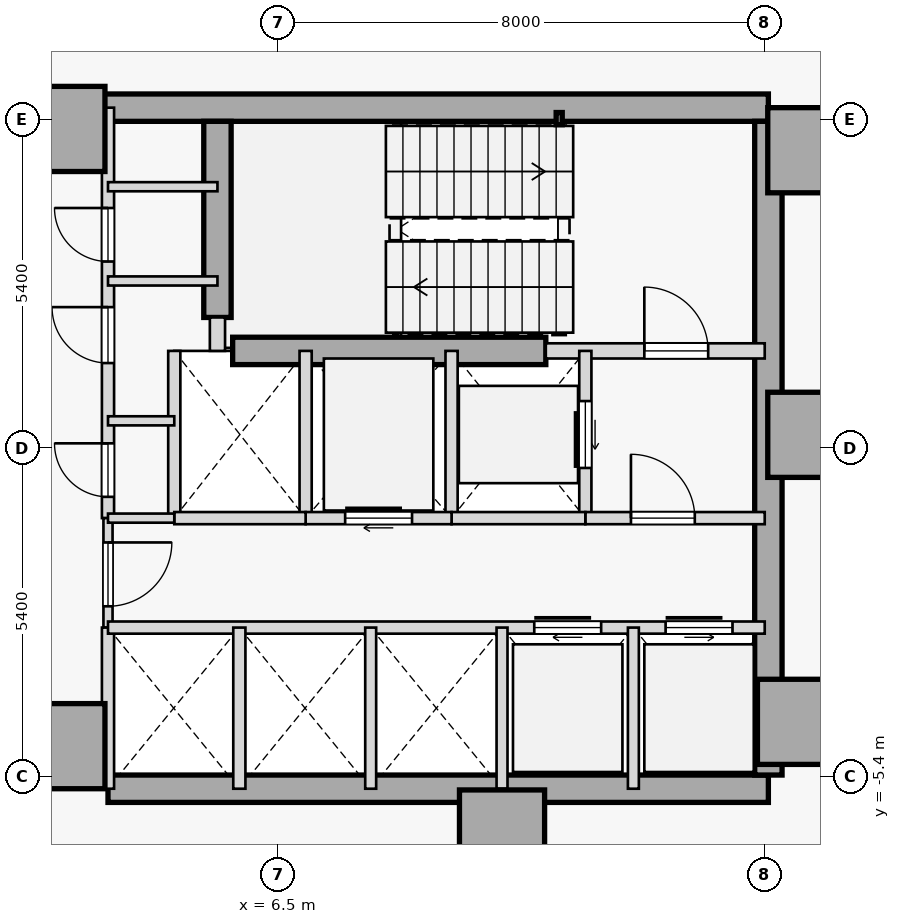
"""IFC4 building model, lengths in metres.
Left out: names, types, materials, properties, quantities, classifications, styles, units other than length and angle.
Written with IfcOpenShell. Run it as: python <this file> out.ifc"""

import sys

from ifc_helpers import new_model, si_unit, direction, frame, frame_2d, origin, origin_2d, place, context, subcontext, project, spatial, rectangle, hollow_rectangle, extrude, element, fill, save


model = new_model("IFC4")
c1 = context("Model", 3, precision=1e-05, world=origin(), true_north=direction((0.0, 1.0)))
c2 = subcontext(c1, "Body", "Model", "MODEL_VIEW")
j1 = project(units=[si_unit("LENGTHUNIT", "METRE"), si_unit("PLANEANGLEUNIT", "RADIAN")], contexts=[c1])
p1 = place(None, origin())
s1 = spatial("IfcSite", under=j1, at=p1, CompositionType="ELEMENT")
p2 = place(p1, origin())
s2 = spatial("IfcBuilding", under=s1, at=p2, CompositionType="ELEMENT")
p3 = place(p2, frame((0.0, 0.0, 63.6)))
s3 = spatial("IfcBuildingStorey", under=s2, at=p3, CompositionType="ELEMENT", Elevation=63.6)
for number, where, z_axis, x_axis in (
    (1, (15.25, 4.9, 0.0), (0.0, 0.0, 1.0), (1.0, 0.0, 0.0)),
    (2, (15.25, 0.22, 0.0), (0.0, 0.0, 1.0), (1.0, 0.0, 0.0)),
    (3, (15.08, -4.5, 0.0), (0.0, 0.0, 1.0), (1.0, 0.0, 0.0)),
    (4, (10.18, -6.32, 0.0), (0.0, 0.0, 1.0), (1.0, 0.0, 0.0)),
    (5, (2.95, -4.9, 0.0), (0.0, 0.0, 1.0), (1.0, 0.0, 0.0)),
    (6, (2.95, 5.25, 0.0), (0.0, 0.0, 1.0), (1.0, 0.0, 0.0)),
):
    element("IfcColumn", number, at=place(p3, frame(where, z_axis=z_axis, x_axis=x_axis)), inside=s3, PredefinedType="COLUMN", context=c2, shape_type="SweptSolid", body=[
        extrude(rectangle(XDim=1.4, YDim=1.4, at=origin_2d()), origin(), (0.0, 0.0, 1.0), 3.8),
    ])
p4 = place(p3, frame((3.15, 5.6, 0.0), z_axis=(0.0, 0.0, 1.0), x_axis=(1.0, 0.0, 0.0)))
e7 = element("IfcWall", 7, at=p4, inside=s3, PredefinedType="SHEAR", context=c2, shape_type="SweptSolid", body=[
    extrude(rectangle(XDim=11.41, YDim=0.45, at=frame_2d((5.705, 0.0))), origin(), (0.0, 0.0, 1.0), 3.575),
])
p5 = place(p3, frame((3.7, -5.6, 0.0), z_axis=(0.0, 0.0, 1.0), x_axis=(1.0, 0.0, 0.0)))
e8 = element("IfcWall", 8, at=p5, inside=s3, PredefinedType="SHEAR", context=c2, shape_type="SweptSolid", body=[
    extrude(rectangle(XDim=10.86, YDim=0.45, at=frame_2d((5.43, 0.0))), origin(), (0.0, 0.0, 1.0), 3.575),
])
p6 = place(p3, frame((14.56, -5.375, 0.0), z_axis=(0.0, 0.0, 1.0), x_axis=(0.0, 1.0, 0.0)))
e9 = element("IfcWall", 9, at=p6, inside=s3, PredefinedType="SHEAR", context=c2, shape_type="SweptSolid", body=[
    extrude(rectangle(XDim=10.75, YDim=0.45, at=frame_2d((5.375, 0.0))), origin(), (0.0, 0.0, 1.0), 3.575),
])
p7 = place(p3, frame((5.5, 2.15, 0.0), z_axis=(0.0, 0.0, 1.0), x_axis=(0.0, 1.0, 0.0)))
e10 = element("IfcWall", 10, at=p7, inside=s3, PredefinedType="SHEAR", context=c2, shape_type="SweptSolid", body=[
    extrude(rectangle(XDim=3.225, YDim=0.45, at=frame_2d((1.613, 0.0))), origin(), (0.0, 0.0, 1.0), 3.575),
])
p8 = place(p3, frame((5.75, 1.6, 0.0), z_axis=(0.0, 0.0, 1.0), x_axis=(1.0, 0.0, 0.0)))
e11 = element("IfcWall", 11, at=p8, inside=s3, PredefinedType="SHEAR", context=c2, shape_type="SweptSolid", body=[
    extrude(rectangle(XDim=5.15, YDim=0.45, at=frame_2d((2.575, 0.0))), origin(), (0.0, 0.0, 1.0), 3.575),
])
p9 = place(p3, frame((11.12, 5.42, 0.0), z_axis=(0.0, 0.0, 1.0), x_axis=(1.0, 0.0, 0.0)))
e12 = element("IfcColumn", 12, at=p9, inside=s3, PredefinedType="COLUMN", context=c2, shape_type="SweptSolid", body=[
    extrude(hollow_rectangle(XDim=0.1, YDim=0.2, WallThickness=0.008, at=origin_2d()), origin(), (0.0, 0.0, 1.0), 3.8),
])
p10 = place(p3, frame((10.9, 1.6, 0.0), z_axis=(0.0, 0.0, 1.0), x_axis=(1.0, 0.0, 0.0)))
e13 = element("IfcWall", 13, at=p10, inside=s3, PredefinedType="STANDARD", context=c2, shape_type="SweptSolid", body=[
    extrude(rectangle(XDim=3.6, YDim=0.25, at=frame_2d((1.8, 0.0))), origin(), (0.0, 0.0, 1.0), 3.575),
])
p11 = place(p10, frame((1.62, 0.0, 0.0)))
e14 = element("IfcOpeningElement", 14, at=p11, cuts=e13, PredefinedType="OPENING", context=c2, shape_type="SweptSolid", body=[
    extrude(rectangle(XDim=1.05, YDim=2.15, at=frame_2d((0.525, 1.075))), frame((0.0, 0.135, 0.0), z_axis=(0.0, -1.0, 0.0), x_axis=(1.0, 0.0, 0.0)), (0.0, 0.0, 1.0), 0.27),
])
p12 = place(p3, frame((5.5, 1.6, 0.0), z_axis=(0.0, 0.0, 1.0), x_axis=(0.0, 1.0, 0.0)))
e15 = element("IfcWall", 15, at=p12, inside=s3, PredefinedType="STANDARD", context=c2, shape_type="SweptSolid", body=[
    extrude(rectangle(XDim=0.55, YDim=0.25, at=frame_2d((0.275, 0.0))), origin(), (0.0, 0.0, 1.0), 3.575),
])
p13 = place(p3, frame((3.7, -1.15, 0.0), z_axis=(0.0, 0.0, 1.0), x_axis=(0.0, 1.0, 0.0)))
e16 = element("IfcWall", 16, at=p13, inside=s3, PredefinedType="STANDARD", context=c2, shape_type="SweptSolid", body=[
    extrude(rectangle(XDim=6.75, YDim=0.2, at=frame_2d((3.375, 0.0))), origin(), (0.0, 0.0, 1.0), 3.575),
])
p14 = place(p13, frame((0.35, 0.0, 0.0)))
e17 = element("IfcOpeningElement", 17, at=p14, cuts=e16, PredefinedType="OPENING", context=c2, shape_type="SweptSolid", body=[
    extrude(rectangle(XDim=0.88, YDim=2.15, at=frame_2d((0.44, 1.075))), frame((0.0, 0.11, 0.0), z_axis=(0.0, -1.0, 0.0), x_axis=(1.0, 0.0, 0.0)), (0.0, 0.0, 1.0), 0.22),
])
p15 = place(p13, frame((2.55, 0.0, 0.0)))
e18 = element("IfcOpeningElement", 18, at=p15, cuts=e16, PredefinedType="OPENING", context=c2, shape_type="SweptSolid", body=[
    extrude(rectangle(XDim=0.92, YDim=2.15, at=frame_2d((0.46, 1.075))), frame((0.0, 0.11, 0.0), z_axis=(0.0, -1.0, 0.0), x_axis=(1.0, 0.0, 0.0)), (0.0, 0.0, 1.0), 0.22),
])
p16 = place(p13, frame((4.22, 0.0, 0.0)))
e19 = element("IfcOpeningElement", 19, at=p16, cuts=e16, PredefinedType="OPENING", context=c2, shape_type="SweptSolid", body=[
    extrude(rectangle(XDim=0.88, YDim=2.15, at=frame_2d((0.44, 1.075))), frame((0.0, 0.11, 0.0), z_axis=(0.0, -1.0, 0.0), x_axis=(1.0, 0.0, 0.0)), (0.0, 0.0, 1.0), 0.22),
])
p17 = place(p3, frame((3.7, -2.95, 0.0), z_axis=(0.0, 0.0, 1.0), x_axis=(0.0, 1.0, 0.0)))
e20 = element("IfcWall", 20, at=p17, inside=s3, PredefinedType="PARTITIONING", context=c2, shape_type="SweptSolid", body=[
    extrude(rectangle(XDim=1.8, YDim=0.15, at=frame_2d((0.9, 0.0))), origin(), (0.0, 0.0, 1.0), 3.575),
])
p18 = place(p17, frame((0.35, 0.0, 0.0)))
e21 = element("IfcOpeningElement", 21, at=p18, cuts=e20, PredefinedType="OPENING", context=c2, shape_type="SweptSolid", body=[
    extrude(rectangle(XDim=1.05, YDim=2.18, at=frame_2d((0.525, 1.09))), frame((0.0, 0.085, 0.0), z_axis=(0.0, -1.0, 0.0), x_axis=(1.0, 0.0, 0.0)), (0.0, 0.0, 1.0), 0.17),
])
p19 = place(p3, frame((3.7, -5.6, 0.0), z_axis=(0.0, 0.0, 1.0), x_axis=(0.0, 1.0, 0.0)))
e22 = element("IfcWall", 22, at=p19, inside=s3, PredefinedType="STANDARD", context=c2, shape_type="SweptSolid", body=[
    extrude(rectangle(XDim=2.65, YDim=0.2, at=frame_2d((1.325, 0.0))), origin(), (0.0, 0.0, 1.0), 3.575),
])
p20 = place(p3, frame((11.55, -1.15, 0.0), z_axis=(0.0, 0.0, 1.0), x_axis=(0.0, 1.0, 0.0)))
e23 = element("IfcWall", 23, at=p20, inside=s3, PredefinedType="STANDARD", context=c2, shape_type="SweptSolid", body=[
    extrude(rectangle(XDim=2.75, YDim=0.2, at=frame_2d((1.375, 0.0))), origin(), (0.0, 0.0, 1.0), 3.575),
])
p21 = place(p20, frame((0.825, 0.0, 0.0)))
e24 = element("IfcOpeningElement", 24, at=p21, cuts=e23, PredefinedType="OPENING", context=c2, shape_type="SweptSolid", body=[
    extrude(rectangle(XDim=1.1, YDim=2.15, at=frame_2d((0.55, 1.075))), frame((0.0, 0.11, 0.0), z_axis=(0.0, -1.0, 0.0), x_axis=(1.0, 0.0, 0.0)), (0.0, 0.0, 1.0), 0.22),
])
p22 = place(p3, frame((9.35, -1.15, 0.0), z_axis=(0.0, 0.0, 1.0), x_axis=(0.0, 1.0, 0.0)))
e25 = element("IfcWall", 25, at=p22, inside=s3, PredefinedType="STANDARD", context=c2, shape_type="SweptSolid", body=[
    extrude(rectangle(XDim=2.75, YDim=0.2, at=frame_2d((1.375, 0.0))), origin(), (0.0, 0.0, 1.0), 3.575),
])
p23 = place(p3, frame((11.55, -1.15, 0.0), z_axis=(0.0, 0.0, 1.0), x_axis=(1.0, 0.0, 0.0)))
e26 = element("IfcWall", 26, at=p23, inside=s3, PredefinedType="STANDARD", context=c2, shape_type="SweptSolid", body=[
    extrude(rectangle(XDim=2.95, YDim=0.2, at=frame_2d((1.475, 0.0))), origin(), (0.0, 0.0, 1.0), 3.575),
])
p24 = place(p23, frame((0.75, 0.0, 0.0)))
e27 = element("IfcOpeningElement", 27, at=p24, cuts=e26, PredefinedType="OPENING", context=c2, shape_type="SweptSolid", body=[
    extrude(rectangle(XDim=1.05, YDim=2.18, at=frame_2d((0.525, 1.09))), frame((0.0, 0.11, 0.0), z_axis=(0.0, -1.0, 0.0), x_axis=(1.0, 0.0, 0.0)), (0.0, 0.0, 1.0), 0.22),
])
p25 = place(p3, frame((9.35, -1.15, 0.0), z_axis=(0.0, 0.0, 1.0), x_axis=(1.0, 0.0, 0.0)))
e28 = element("IfcWall", 28, at=p25, inside=s3, PredefinedType="STANDARD", context=c2, shape_type="SweptSolid", body=[
    extrude(rectangle(XDim=2.2, YDim=0.2, at=frame_2d((1.1, 0.0))), origin(), (0.0, 0.0, 1.0), 3.575),
])
p26 = place(p3, frame((6.95, -1.15, 0.0), z_axis=(0.0, 0.0, 1.0), x_axis=(0.0, 1.0, 0.0)))
e29 = element("IfcWall", 29, at=p26, inside=s3, PredefinedType="STANDARD", context=c2, shape_type="SweptSolid", body=[
    extrude(rectangle(XDim=2.75, YDim=0.2, at=frame_2d((1.375, 0.0))), origin(), (0.0, 0.0, 1.0), 3.575),
])
p27 = place(p3, frame((6.95, -1.15, 0.0), z_axis=(0.0, 0.0, 1.0), x_axis=(1.0, 0.0, 0.0)))
e30 = element("IfcWall", 30, at=p27, inside=s3, PredefinedType="STANDARD", context=c2, shape_type="SweptSolid", body=[
    extrude(rectangle(XDim=2.4, YDim=0.2, at=frame_2d((1.2, 0.0))), origin(), (0.0, 0.0, 1.0), 3.575),
])
p28 = place(p27, frame((0.65, 0.0, 0.0)))
e31 = element("IfcOpeningElement", 31, at=p28, cuts=e30, PredefinedType="OPENING", context=c2, shape_type="SweptSolid", body=[
    extrude(rectangle(XDim=1.1, YDim=2.15, at=frame_2d((0.55, 1.075))), frame((0.0, 0.11, 0.0), z_axis=(0.0, -1.0, 0.0), x_axis=(1.0, 0.0, 0.0)), (0.0, 0.0, 1.0), 0.22),
])
p29 = place(p3, frame((4.79, -1.15, 0.0), z_axis=(0.0, 0.0, 1.0), x_axis=(0.0, 1.0, 0.0)))
e32 = element("IfcWall", 32, at=p29, inside=s3, PredefinedType="STANDARD", context=c2, shape_type="SweptSolid", body=[
    extrude(rectangle(XDim=2.75, YDim=0.2, at=frame_2d((1.375, 0.0))), origin(), (0.0, 0.0, 1.0), 3.575),
])
p30 = place(p3, frame((4.79, -1.15, 0.0), z_axis=(0.0, 0.0, 1.0), x_axis=(1.0, 0.0, 0.0)))
e33 = element("IfcWall", 33, at=p30, inside=s3, PredefinedType="STANDARD", context=c2, shape_type="SweptSolid", body=[
    extrude(rectangle(XDim=2.16, YDim=0.2, at=frame_2d((1.08, 0.0))), origin(), (0.0, 0.0, 1.0), 3.575),
])
p31 = place(p3, frame((3.7, -1.15, 0.0), z_axis=(0.0, 0.0, 1.0), x_axis=(1.0, 0.0, 0.0)))
e34 = element("IfcWall", 34, at=p31, inside=s3, PredefinedType="PARTITIONING", context=c2, shape_type="SweptSolid", body=[
    extrude(rectangle(XDim=1.09, YDim=0.15, at=frame_2d((0.545, 0.0))), origin(), (0.0, 0.0, 1.0), 3.575),
])
p32 = place(p3, frame((3.7, -2.95, 0.0), z_axis=(0.0, 0.0, 1.0), x_axis=(1.0, 0.0, 0.0)))
e35 = element("IfcWall", 35, at=p32, inside=s3, PredefinedType="STANDARD", context=c2, shape_type="SweptSolid", body=[
    extrude(rectangle(XDim=10.8, YDim=0.2, at=frame_2d((5.4, 0.0))), origin(), (0.0, 0.0, 1.0), 3.575),
])
p33 = place(p32, frame((7.01, 0.0, 0.0)))
e36 = element("IfcOpeningElement", 36, at=p33, cuts=e35, PredefinedType="OPENING", context=c2, shape_type="SweptSolid", body=[
    extrude(rectangle(XDim=1.1, YDim=2.15, at=frame_2d((0.55, 1.075))), frame((0.0, 0.11, 0.0), z_axis=(0.0, -1.0, 0.0), x_axis=(1.0, 0.0, 0.0)), (0.0, 0.0, 1.0), 0.22),
])
p34 = place(p32, frame((9.17, 0.0, 0.0)))
e37 = element("IfcOpeningElement", 37, at=p34, cuts=e35, PredefinedType="OPENING", context=c2, shape_type="SweptSolid", body=[
    extrude(rectangle(XDim=1.1, YDim=2.15, at=frame_2d((0.55, 1.075))), frame((0.0, 0.11, 0.0), z_axis=(0.0, -1.0, 0.0), x_axis=(1.0, 0.0, 0.0)), (0.0, 0.0, 1.0), 0.22),
])
p35 = place(p3, frame((5.86, -5.6, 0.0), z_axis=(0.0, 0.0, 1.0), x_axis=(0.0, 1.0, 0.0)))
e38 = element("IfcWall", 38, at=p35, inside=s3, PredefinedType="STANDARD", context=c2, shape_type="SweptSolid", body=[
    extrude(rectangle(XDim=2.65, YDim=0.2, at=frame_2d((1.325, 0.0))), origin(), (0.0, 0.0, 1.0), 3.575),
])
for number, where, z_axis, x_axis in (
    (39, (12.34, -5.6, 0.0), (0.0, 0.0, 1.0), (0.0, 1.0, 0.0)),
    (40, (10.18, -5.6, 0.0), (0.0, 0.0, 1.0), (0.0, 1.0, 0.0)),
    (41, (8.02, -5.6, 0.0), (0.0, 0.0, 1.0), (0.0, 1.0, 0.0)),
):
    element("IfcWall", number, at=place(p3, frame(where, z_axis=z_axis, x_axis=x_axis)), inside=s3, PredefinedType="STANDARD", context=c2, shape_type="SweptSolid", body=[
        extrude(rectangle(XDim=2.65, YDim=0.18, at=frame_2d((1.325, 0.0))), origin(), (0.0, 0.0, 1.0), 3.575),
    ])
p36 = place(p3, frame((3.7, 4.3, 0.0), z_axis=(0.0, 0.0, 1.0), x_axis=(1.0, 0.0, 0.0)))
e42 = element("IfcWall", 42, at=p36, inside=s3, PredefinedType="PARTITIONING", context=c2, shape_type="SweptSolid", body=[
    extrude(rectangle(XDim=1.8, YDim=0.15, at=frame_2d((0.9, 0.0))), origin(), (0.0, 0.0, 1.0), 3.575),
])
p37 = place(p3, frame((3.7, 0.45, 0.0), z_axis=(0.0, 0.0, 1.0), x_axis=(1.0, 0.0, 0.0)))
e43 = element("IfcWall", 43, at=p37, inside=s3, PredefinedType="PARTITIONING", context=c2, shape_type="SweptSolid", body=[
    extrude(rectangle(XDim=1.09, YDim=0.15, at=frame_2d((0.545, 0.0))), origin(), (0.0, 0.0, 1.0), 3.575),
])
p38 = place(p3, frame((3.7, 2.75, 0.0), z_axis=(0.0, 0.0, 1.0), x_axis=(1.0, 0.0, 0.0)))
e44 = element("IfcWall", 44, at=p38, inside=s3, PredefinedType="PARTITIONING", context=c2, shape_type="SweptSolid", body=[
    extrude(rectangle(XDim=1.8, YDim=0.15, at=frame_2d((0.9, 0.0))), origin(), (0.0, 0.0, 1.0), 3.575),
])
p39 = place(p11, origin())
e45 = element("IfcDoor", 45, at=p39, inside=s3, OperationType="SINGLE_SWING_LEFT", PredefinedType="DOOR", context=c2, shape_type="SweptSolid", body=[
    extrude(rectangle(XDim=1.05, YDim=2.15, at=frame_2d((0.525, 1.075))), frame((0.0, 0.025, 0.0), z_axis=(0.0, -1.0, 0.0), x_axis=(1.0, 0.0, 0.0)), (0.0, 0.0, 1.0), 0.05),
])
fill(e14, e45)
p40 = place(p24, origin())
e46 = element("IfcDoor", 46, at=p40, inside=s3, OperationType="SINGLE_SWING_LEFT", PredefinedType="DOOR", context=c2, shape_type="SweptSolid", body=[
    extrude(rectangle(XDim=1.05, YDim=2.18, at=frame_2d((0.525, 1.09))), frame((0.0, 0.025, 0.0), z_axis=(0.0, -1.0, 0.0), x_axis=(1.0, 0.0, 0.0)), (0.0, 0.0, 1.0), 0.05),
])
fill(e27, e46)
p41 = place(p18, frame((1.05, 0.0, 0.0), z_axis=(0.0, 0.0, 1.0), x_axis=(-1.0, 0.0, 0.0)))
e47 = element("IfcDoor", 47, at=p41, inside=s3, OperationType="SINGLE_SWING_RIGHT", PredefinedType="DOOR", context=c2, shape_type="SweptSolid", body=[
    extrude(rectangle(XDim=1.05, YDim=2.18, at=frame_2d((0.525, 1.09))), frame((0.0, 0.025, 0.0), z_axis=(0.0, -1.0, 0.0), x_axis=(1.0, 0.0, 0.0)), (0.0, 0.0, 1.0), 0.05),
])
fill(e21, e47)
p42 = place(p21, origin())
e48 = element("IfcDoor", 48, at=p42, inside=s3, OperationType="SLIDING_TO_RIGHT", PredefinedType="DOOR", context=c2, shape_type="SweptSolid", body=[
    extrude(rectangle(XDim=1.1, YDim=2.15, at=frame_2d((0.55, 1.075))), frame((0.0, 0.025, 0.0), z_axis=(0.0, -1.0, 0.0), x_axis=(1.0, 0.0, 0.0)), (0.0, 0.0, 1.0), 0.05),
])
fill(e24, e48)
p43 = place(p28, origin())
e49 = element("IfcDoor", 49, at=p43, inside=s3, OperationType="SLIDING_TO_RIGHT", PredefinedType="DOOR", context=c2, shape_type="SweptSolid", body=[
    extrude(rectangle(XDim=1.1, YDim=2.15, at=frame_2d((0.55, 1.075))), frame((0.0, 0.025, 0.0), z_axis=(0.0, -1.0, 0.0), x_axis=(1.0, 0.0, 0.0)), (0.0, 0.0, 1.0), 0.05),
])
fill(e31, e49)
p44 = place(p33, origin())
e50 = element("IfcDoor", 50, at=p44, inside=s3, OperationType="SLIDING_TO_RIGHT", PredefinedType="DOOR", context=c2, shape_type="SweptSolid", body=[
    extrude(rectangle(XDim=1.1, YDim=2.15, at=frame_2d((0.55, 1.075))), frame((0.0, 0.025, 0.0), z_axis=(0.0, -1.0, 0.0), x_axis=(1.0, 0.0, 0.0)), (0.0, 0.0, 1.0), 0.05),
])
fill(e36, e50)
p45 = place(p34, origin())
e51 = element("IfcDoor", 51, at=p45, inside=s3, OperationType="SLIDING_TO_LEFT", PredefinedType="DOOR", context=c2, shape_type="SweptSolid", body=[
    extrude(rectangle(XDim=1.1, YDim=2.15, at=frame_2d((0.55, 1.075))), frame((0.0, 0.025, 0.0), z_axis=(0.0, -1.0, 0.0), x_axis=(1.0, 0.0, 0.0)), (0.0, 0.0, 1.0), 0.05),
])
fill(e37, e51)
p46 = place(p14, origin())
e52 = element("IfcDoor", 52, at=p46, inside=s3, OperationType="SINGLE_SWING_RIGHT", PredefinedType="DOOR", context=c2, shape_type="SweptSolid", body=[
    extrude(rectangle(XDim=0.88, YDim=2.15, at=frame_2d((0.44, 1.075))), frame((0.0, 0.025, 0.0), z_axis=(0.0, -1.0, 0.0), x_axis=(1.0, 0.0, 0.0)), (0.0, 0.0, 1.0), 0.05),
])
fill(e17, e52)
p47 = place(p15, origin())
e53 = element("IfcDoor", 53, at=p47, inside=s3, OperationType="SINGLE_SWING_RIGHT", PredefinedType="DOOR", context=c2, shape_type="SweptSolid", body=[
    extrude(rectangle(XDim=0.92, YDim=2.15, at=frame_2d((0.46, 1.075))), frame((0.0, 0.025, 0.0), z_axis=(0.0, -1.0, 0.0), x_axis=(1.0, 0.0, 0.0)), (0.0, 0.0, 1.0), 0.05),
])
fill(e18, e53)
p48 = place(p16, origin())
e54 = element("IfcDoor", 54, at=p48, inside=s3, OperationType="SINGLE_SWING_RIGHT", PredefinedType="DOOR", context=c2, shape_type="SweptSolid", body=[
    extrude(rectangle(XDim=0.88, YDim=2.15, at=frame_2d((0.44, 1.075))), frame((0.0, 0.025, 0.0), z_axis=(0.0, -1.0, 0.0), x_axis=(1.0, 0.0, 0.0)), (0.0, 0.0, 1.0), 0.05),
])
fill(e19, e54)
save(model, sys.argv[1])
